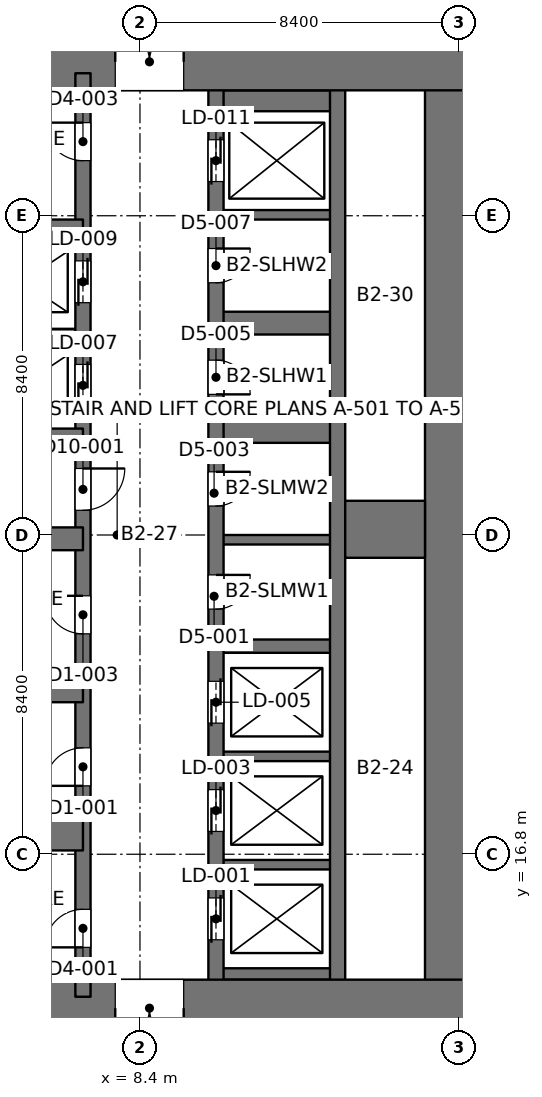
"""IFC4 building model, lengths in metres.
Left out: names, types, materials, properties, quantities, classifications, styles, units other than length and angle.
Written with IfcOpenShell. Run it as: python <this file> out.ifc"""

import sys

from ifc_helpers import new_model, si_unit, direction, frame, frame_2d, origin, place, context, subcontext, project, spatial, rectangle, extrude, element, fill, save


model = new_model("IFC4")
c1 = context("Model", 3, precision=1e-05, world=origin(), true_north=direction((0.0, 1.0)))
c2 = subcontext(c1, "Body", "Model", "MODEL_VIEW")
j1 = project(units=[si_unit("LENGTHUNIT", "METRE"), si_unit("PLANEANGLEUNIT", "RADIAN")], contexts=[c1])
p1 = place(None, origin())
s1 = spatial("IfcSite", under=j1, at=p1, CompositionType="ELEMENT")
p2 = place(p1, origin())
s2 = spatial("IfcBuilding", under=s1, at=p2, CompositionType="ELEMENT")
p3 = place(p2, frame((0.0, 0.0, -8.4)))
s3 = spatial("IfcBuildingStorey", under=s2, at=p3, CompositionType="ELEMENT", Elevation=-8.4)
p4 = place(p3, frame((-1.8, 12.75, 0.0), z_axis=(0.0, 0.0, 1.0), x_axis=(1.0, 0.0, 0.0)))
e1 = element("IfcWall", 1, at=p4, inside=s3, PredefinedType="SHEAR", context=c2, shape_type="SweptSolid", body=[
    extrude(rectangle(XDim=19.2, YDim=1.5, at=frame_2d((9.6, 0.0))), origin(), (0.0, 0.0, 1.0), 4.2),
])
p5 = place(p4, frame((9.55, 0.0, 0.0)))
e2 = element("IfcOpeningElement", 2, at=p5, cuts=e1, PredefinedType="OPENING", context=c2, shape_type="SweptSolid", body=[
    extrude(rectangle(XDim=1.8, YDim=2.4, at=frame_2d((0.9, 1.2))), frame((0.0, 0.76, 0.0), z_axis=(0.0, -1.0, 0.0), x_axis=(1.0, 0.0, 0.0)), (0.0, 0.0, 1.0), 1.52),
])
p6 = place(p3, frame((-1.8, 37.65, 0.0), z_axis=(0.0, 0.0, 1.0), x_axis=(1.0, 0.0, 0.0)))
e3 = element("IfcWall", 3, at=p6, inside=s3, PredefinedType="SHEAR", context=c2, shape_type="SweptSolid", body=[
    extrude(rectangle(XDim=19.2, YDim=1.5, at=frame_2d((9.6, 0.0))), origin(), (0.0, 0.0, 1.0), 4.2),
])
p7 = place(p6, frame((9.55, 0.0, 0.0)))
e4 = element("IfcOpeningElement", 4, at=p7, cuts=e3, PredefinedType="OPENING", context=c2, shape_type="SweptSolid", body=[
    extrude(rectangle(XDim=1.8, YDim=2.4, at=frame_2d((0.9, 1.2))), frame((0.0, 0.76, 0.0), z_axis=(0.0, -1.0, 0.0), x_axis=(1.0, 0.0, 0.0)), (0.0, 0.0, 1.0), 1.52),
])
p8 = place(p3, frame((16.65, 12.75, 0.0), z_axis=(0.0, 0.0, 1.0), x_axis=(0.0, 1.0, 0.0)))
e5 = element("IfcWall", 5, at=p8, inside=s3, PredefinedType="SHEAR", context=c2, shape_type="SweptSolid", body=[
    extrude(rectangle(XDim=24.9, YDim=1.5, at=frame_2d((12.45, 0.0))), origin(), (0.0, 0.0, 1.0), 4.2),
])
p9 = place(p3, frame((6.9, 13.05, 0.0), z_axis=(0.0, 0.0, 1.0), x_axis=(0.0, 1.0, 0.0)))
e6 = element("IfcWall", 6, at=p9, inside=s3, PredefinedType="SHEAR", context=c2, shape_type="SweptSolid", body=[
    extrude(rectangle(XDim=24.3, YDim=0.4, at=frame_2d((12.15, 0.0))), origin(), (0.0, 0.0, 1.0), 4.2),
])
p10 = place(p9, frame((1.3, 0.0, 0.0)))
e7 = element("IfcOpeningElement", 7, at=p10, cuts=e6, PredefinedType="OPENING", context=c2, shape_type="SweptSolid", body=[
    extrude(rectangle(XDim=1.0, YDim=2.2, at=frame_2d((0.5, 1.1))), frame((0.0, 0.21, 0.0), z_axis=(0.0, -1.0, 0.0), x_axis=(1.0, 0.0, 0.0)), (0.0, 0.0, 1.0), 0.42),
])
p11 = place(p9, frame((22.0, 0.0, 0.0)))
e8 = element("IfcOpeningElement", 8, at=p11, cuts=e6, PredefinedType="OPENING", context=c2, shape_type="SweptSolid", body=[
    extrude(rectangle(XDim=1.0, YDim=2.2, at=frame_2d((0.5, 1.1))), frame((0.0, 0.21, 0.0), z_axis=(0.0, -1.0, 0.0), x_axis=(1.0, 0.0, 0.0)), (0.0, 0.0, 1.0), 0.42),
])
p12 = place(p9, frame((5.55, 0.0, 0.0)))
e9 = element("IfcOpeningElement", 9, at=p12, cuts=e6, PredefinedType="OPENING", context=c2, shape_type="SweptSolid", body=[
    extrude(rectangle(XDim=1.0, YDim=2.2, at=frame_2d((0.5, 1.1))), frame((0.0, 0.21, 0.0), z_axis=(0.0, -1.0, 0.0), x_axis=(1.0, 0.0, 0.0)), (0.0, 0.0, 1.0), 0.42),
])
p13 = place(p9, frame((9.55, 0.0, 0.0)))
e10 = element("IfcOpeningElement", 10, at=p13, cuts=e6, PredefinedType="OPENING", context=c2, shape_type="SweptSolid", body=[
    extrude(rectangle(XDim=1.0, YDim=2.2, at=frame_2d((0.5, 1.1))), frame((0.0, 0.21, 0.0), z_axis=(0.0, -1.0, 0.0), x_axis=(1.0, 0.0, 0.0)), (0.0, 0.0, 1.0), 0.42),
])
p14 = place(p9, frame((12.8, 0.0, 0.0)))
e11 = element("IfcOpeningElement", 11, at=p14, cuts=e6, PredefinedType="OPENING", context=c2, shape_type="SweptSolid", body=[
    extrude(rectangle(XDim=1.1, YDim=2.2, at=frame_2d((0.55, 1.1))), frame((0.0, 0.21, 0.0), z_axis=(0.0, -1.0, 0.0), x_axis=(1.0, 0.0, 0.0)), (0.0, 0.0, 1.0), 0.42),
])
p15 = place(p9, frame((15.538, 0.0, 0.0)))
e12 = element("IfcOpeningElement", 12, at=p15, cuts=e6, PredefinedType="OPENING", context=c2, shape_type="SweptSolid", body=[
    extrude(rectangle(XDim=1.1, YDim=2.2, at=frame_2d((0.55, 1.1))), frame((0.0, 0.21, 0.0), z_axis=(0.0, -1.0, 0.0), x_axis=(1.0, 0.0, 0.0)), (0.0, 0.0, 1.0), 0.42),
])
p16 = place(p9, frame((18.262, 0.0, 0.0)))
e13 = element("IfcOpeningElement", 13, at=p16, cuts=e6, PredefinedType="OPENING", context=c2, shape_type="SweptSolid", body=[
    extrude(rectangle(XDim=1.1, YDim=2.2, at=frame_2d((0.55, 1.1))), frame((0.0, 0.21, 0.0), z_axis=(0.0, -1.0, 0.0), x_axis=(1.0, 0.0, 0.0)), (0.0, 0.0, 1.0), 0.42),
])
p17 = place(p3, frame((10.4, 13.05, 0.0), z_axis=(0.0, 0.0, 1.0), x_axis=(0.0, 1.0, 0.0)))
e14 = element("IfcWall", 14, at=p17, inside=s3, PredefinedType="SHEAR", context=c2, shape_type="SweptSolid", body=[
    extrude(rectangle(XDim=24.3, YDim=0.4, at=frame_2d((12.15, 0.0))), origin(), (0.0, 0.0, 1.0), 4.2),
])
p18 = place(p17, frame((1.5, 0.0, 0.0)))
e15 = element("IfcOpeningElement", 15, at=p18, cuts=e14, PredefinedType="OPENING", context=c2, shape_type="SweptSolid", body=[
    extrude(rectangle(XDim=1.1, YDim=2.2, at=frame_2d((0.55, 1.1))), frame((0.0, 0.21, 0.0), z_axis=(0.0, -1.0, 0.0), x_axis=(1.0, 0.0, 0.0)), (0.0, 0.0, 1.0), 0.42),
])
p19 = place(p17, frame((4.35, 0.0, 0.0)))
e16 = element("IfcOpeningElement", 16, at=p19, cuts=e14, PredefinedType="OPENING", context=c2, shape_type="SweptSolid", body=[
    extrude(rectangle(XDim=1.1, YDim=2.2, at=frame_2d((0.55, 1.1))), frame((0.0, 0.21, 0.0), z_axis=(0.0, -1.0, 0.0), x_axis=(1.0, 0.0, 0.0)), (0.0, 0.0, 1.0), 0.42),
])
p20 = place(p17, frame((7.2, 0.0, 0.0)))
e17 = element("IfcOpeningElement", 17, at=p20, cuts=e14, PredefinedType="OPENING", context=c2, shape_type="SweptSolid", body=[
    extrude(rectangle(XDim=1.1, YDim=2.2, at=frame_2d((0.55, 1.1))), frame((0.0, 0.21, 0.0), z_axis=(0.0, -1.0, 0.0), x_axis=(1.0, 0.0, 0.0)), (0.0, 0.0, 1.0), 0.42),
])
p21 = place(p17, frame((21.45, 0.0, 0.0)))
e18 = element("IfcOpeningElement", 18, at=p21, cuts=e14, PredefinedType="OPENING", context=c2, shape_type="SweptSolid", body=[
    extrude(rectangle(XDim=1.1, YDim=2.2, at=frame_2d((0.55, 1.1))), frame((0.0, 0.21, 0.0), z_axis=(0.0, -1.0, 0.0), x_axis=(1.0, 0.0, 0.0)), (0.0, 0.0, 1.0), 0.42),
])
p22 = place(p17, frame((10.2, 0.0, 0.0)))
e19 = element("IfcOpeningElement", 19, at=p22, cuts=e14, PredefinedType="OPENING", context=c2, shape_type="SweptSolid", body=[
    extrude(rectangle(XDim=0.9, YDim=2.2, at=frame_2d((0.45, 1.1))), frame((0.0, 0.21, 0.0), z_axis=(0.0, -1.0, 0.0), x_axis=(1.0, 0.0, 0.0)), (0.0, 0.0, 1.0), 0.42),
])
p23 = place(p17, frame((12.913, 0.0, 0.0)))
e20 = element("IfcOpeningElement", 20, at=p23, cuts=e14, PredefinedType="OPENING", context=c2, shape_type="SweptSolid", body=[
    extrude(rectangle(XDim=0.9, YDim=2.2, at=frame_2d((0.45, 1.1))), frame((0.0, 0.21, 0.0), z_axis=(0.0, -1.0, 0.0), x_axis=(1.0, 0.0, 0.0)), (0.0, 0.0, 1.0), 0.42),
])
p24 = place(p17, frame((15.85, 0.0, 0.0)))
e21 = element("IfcOpeningElement", 21, at=p24, cuts=e14, PredefinedType="OPENING", context=c2, shape_type="SweptSolid", body=[
    extrude(rectangle(XDim=0.9, YDim=2.2, at=frame_2d((0.45, 1.1))), frame((0.0, 0.21, 0.0), z_axis=(0.0, -1.0, 0.0), x_axis=(1.0, 0.0, 0.0)), (0.0, 0.0, 1.0), 0.42),
])
p25 = place(p17, frame((18.788, 0.0, 0.0)))
e22 = element("IfcOpeningElement", 22, at=p25, cuts=e14, PredefinedType="OPENING", context=c2, shape_type="SweptSolid", body=[
    extrude(rectangle(XDim=0.9, YDim=2.2, at=frame_2d((0.45, 1.1))), frame((0.0, 0.21, 0.0), z_axis=(0.0, -1.0, 0.0), x_axis=(1.0, 0.0, 0.0)), (0.0, 0.0, 1.0), 0.42),
])
p26 = place(p3, frame((13.6, 13.05, 0.0), z_axis=(0.0, 0.0, 1.0), x_axis=(0.0, 1.0, 0.0)))
e23 = element("IfcWall", 23, at=p26, inside=s3, PredefinedType="SHEAR", context=c2, shape_type="SweptSolid", body=[
    extrude(rectangle(XDim=24.3, YDim=0.4, at=frame_2d((12.15, 0.0))), origin(), (0.0, 0.0, 1.0), 4.2),
])
p27 = place(p3, frame((-0.75, 17.35, 0.0), z_axis=(0.0, 0.0, 1.0), x_axis=(1.0, 0.0, 0.0)))
e24 = element("IfcWall", 24, at=p27, inside=s3, PredefinedType="SHEAR", context=c2, shape_type="SweptSolid", body=[
    extrude(rectangle(XDim=7.65, YDim=0.9, at=frame_2d((3.825, 0.0))), origin(), (0.0, 0.0, 1.0), 4.2),
])
for number, where, z_axis, x_axis in (
    (25, (-0.75, 21.1, 0.0), (0.0, 0.0, 1.0), (1.0, 0.0, 0.0)),
    (26, (-0.75, 25.1, 0.0), (0.0, 0.0, 1.0), (1.0, 0.0, 0.0)),
    (27, (-0.75, 27.7, 0.0), (0.0, 0.0, 1.0), (1.0, 0.0, 0.0)),
):
    element("IfcWall", number, at=place(p3, frame(where, z_axis=z_axis, x_axis=x_axis)), inside=s3, PredefinedType="SHEAR", context=c2, shape_type="SweptSolid", body=[
        extrude(rectangle(XDim=7.65, YDim=0.6, at=frame_2d((3.825, 0.0))), origin(), (0.0, 0.0, 1.0), 4.2),
    ])
p28 = place(p3, frame((3.7, 33.3, 0.0), z_axis=(0.0, 0.0, 1.0), x_axis=(1.0, 0.0, 0.0)))
e28 = element("IfcWall", 28, at=p28, inside=s3, PredefinedType="SHEAR", context=c2, shape_type="SweptSolid", body=[
    extrude(rectangle(XDim=3.2, YDim=0.4, at=frame_2d((1.6, 0.0))), origin(), (0.0, 0.0, 1.0), 4.2),
])
p29 = place(p3, frame((3.7, 30.5, 0.0), z_axis=(0.0, 0.0, 1.0), x_axis=(1.0, 0.0, 0.0)))
e29 = element("IfcWall", 29, at=p29, inside=s3, PredefinedType="SHEAR", context=c2, shape_type="SweptSolid", body=[
    extrude(rectangle(XDim=3.2, YDim=0.25, at=frame_2d((1.6, 0.0))), origin(), (0.0, 0.0, 1.0), 4.2),
])
p30 = place(p3, frame((13.8, 25.35, 0.0), z_axis=(0.0, 0.0, 1.0), x_axis=(1.0, 0.0, 0.0)))
e30 = element("IfcWall", 30, at=p30, inside=s3, PredefinedType="SHEAR", context=c2, shape_type="SweptSolid", body=[
    extrude(rectangle(XDim=2.1, YDim=1.5, at=frame_2d((1.05, 0.0))), origin(), (0.0, 0.0, 1.0), 4.2),
])
p31 = place(p3, frame((10.4, 13.65, 0.0), z_axis=(0.0, 0.0, 1.0), x_axis=(1.0, 0.0, 0.0)))
e31 = element("IfcWall", 31, at=p31, inside=s3, PredefinedType="SHEAR", context=c2, shape_type="SweptSolid", body=[
    extrude(rectangle(XDim=3.2, YDim=0.3, at=frame_2d((1.6, 0.0))), origin(), (0.0, 0.0, 1.0), 4.2),
])
for number, where, z_axis, x_axis in (
    (32, (10.4, 16.525, 0.0), (0.0, 0.0, 1.0), (1.0, 0.0, 0.0)),
    (33, (10.4, 19.375, 0.0), (0.0, 0.0, 1.0), (1.0, 0.0, 0.0)),
):
    element("IfcWall", number, at=place(p3, frame(where, z_axis=z_axis, x_axis=x_axis)), inside=s3, PredefinedType="SHEAR", context=c2, shape_type="SweptSolid", body=[
        extrude(rectangle(XDim=3.2, YDim=0.25, at=frame_2d((1.6, 0.0))), origin(), (0.0, 0.0, 1.0), 4.2),
    ])
p32 = place(p3, frame((10.4, 22.275, 0.0), z_axis=(0.0, 0.0, 1.0), x_axis=(1.0, 0.0, 0.0)))
e34 = element("IfcWall", 34, at=p32, inside=s3, PredefinedType="SHEAR", context=c2, shape_type="SweptSolid", body=[
    extrude(rectangle(XDim=3.2, YDim=0.35, at=frame_2d((1.6, 0.0))), origin(), (0.0, 0.0, 1.0), 4.2),
])
p33 = place(p3, frame((10.4, 25.075, 0.0), z_axis=(0.0, 0.0, 1.0), x_axis=(1.0, 0.0, 0.0)))
e35 = element("IfcWall", 35, at=p33, inside=s3, PredefinedType="SHEAR", context=c2, shape_type="SweptSolid", body=[
    extrude(rectangle(XDim=3.2, YDim=0.25, at=frame_2d((1.6, 0.0))), origin(), (0.0, 0.0, 1.0), 4.2),
])
for number, where, z_axis, x_axis in (
    (36, (10.4, 27.925, 0.0), (0.0, 0.0, 1.0), (1.0, 0.0, 0.0)),
    (37, (10.4, 30.775, 0.0), (0.0, 0.0, 1.0), (1.0, 0.0, 0.0)),
):
    element("IfcWall", number, at=place(p3, frame(where, z_axis=z_axis, x_axis=x_axis)), inside=s3, PredefinedType="SHEAR", context=c2, shape_type="SweptSolid", body=[
        extrude(rectangle(XDim=3.2, YDim=0.6, at=frame_2d((1.6, 0.0))), origin(), (0.0, 0.0, 1.0), 4.2),
    ])
p34 = place(p3, frame((10.4, 33.625, 0.0), z_axis=(0.0, 0.0, 1.0), x_axis=(1.0, 0.0, 0.0)))
e38 = element("IfcWall", 38, at=p34, inside=s3, PredefinedType="SHEAR", context=c2, shape_type="SweptSolid", body=[
    extrude(rectangle(XDim=3.2, YDim=0.25, at=frame_2d((1.6, 0.0))), origin(), (0.0, 0.0, 1.0), 4.2),
])
p35 = place(p3, frame((10.4, 36.625, 0.0), z_axis=(0.0, 0.0, 1.0), x_axis=(1.0, 0.0, 0.0)))
e39 = element("IfcWall", 39, at=p35, inside=s3, PredefinedType="SHEAR", context=c2, shape_type="SweptSolid", body=[
    extrude(rectangle(XDim=3.2, YDim=0.55, at=frame_2d((1.6, 0.0))), origin(), (0.0, 0.0, 1.0), 4.2),
])
p36 = place(p3, frame((16.82, 25.2, 0.0), z_axis=(0.0, 0.0, 1.0), x_axis=(1.0, 0.0, 0.0)))
e40 = element("IfcWall", 40, at=p36, inside=s3, PredefinedType="PARTITIONING", context=c2, shape_type="SweptSolid", body=[
    extrude(rectangle(XDim=16.76, YDim=0.25, at=frame_2d((8.38, 0.0))), origin(), (0.0, 0.0, 1.0), 3.85),
])
p37 = place(p36, frame((3.18, 0.0, 0.0)))
e41 = element("IfcOpeningElement", 41, at=p37, cuts=e40, PredefinedType="OPENING", context=c2, shape_type="SweptSolid", body=[
    extrude(rectangle(XDim=2.0, YDim=2.4, at=frame_2d((1.0, 1.2))), frame((0.0, 0.135, 0.0), z_axis=(0.0, -1.0, 0.0), x_axis=(1.0, 0.0, 0.0)), (0.0, 0.0, 1.0), 0.27),
])
p38 = place(p5, frame((1.8, 0.0, 0.0), z_axis=(0.0, 0.0, 1.0), x_axis=(-1.0, 0.0, 0.0)))
e42 = element("IfcDoor", 42, at=p38, inside=s3, OperationType="DOUBLE_DOOR_SINGLE_SWING", PredefinedType="DOOR", context=c2, shape_type="SweptSolid", body=[
    extrude(rectangle(XDim=1.8, YDim=2.4, at=frame_2d((0.9, 1.2))), frame((0.0, 0.025, 0.0), z_axis=(0.0, -1.0, 0.0), x_axis=(1.0, 0.0, 0.0)), (0.0, 0.0, 1.0), 0.05),
])
fill(e2, e42)
p39 = place(p7, origin())
e43 = element("IfcDoor", 43, at=p39, inside=s3, OperationType="DOUBLE_DOOR_SINGLE_SWING", PredefinedType="DOOR", context=c2, shape_type="SweptSolid", body=[
    extrude(rectangle(XDim=1.8, YDim=2.4, at=frame_2d((0.9, 1.2))), frame((0.0, 0.025, 0.0), z_axis=(0.0, -1.0, 0.0), x_axis=(1.0, 0.0, 0.0)), (0.0, 0.0, 1.0), 0.05),
])
fill(e4, e43)
p40 = place(p10, origin())
e44 = element("IfcDoor", 44, at=p40, inside=s3, OperationType="SINGLE_SWING_LEFT", PredefinedType="DOOR", context=c2, shape_type="SweptSolid", body=[
    extrude(rectangle(XDim=1.0, YDim=2.2, at=frame_2d((0.5, 1.1))), frame((0.0, 0.025, 0.0), z_axis=(0.0, -1.0, 0.0), x_axis=(1.0, 0.0, 0.0)), (0.0, 0.0, 1.0), 0.05),
])
fill(e7, e44)
p41 = place(p11, origin())
e45 = element("IfcDoor", 45, at=p41, inside=s3, OperationType="SINGLE_SWING_RIGHT", PredefinedType="DOOR", context=c2, shape_type="SweptSolid", body=[
    extrude(rectangle(XDim=1.0, YDim=2.2, at=frame_2d((0.5, 1.1))), frame((0.0, 0.025, 0.0), z_axis=(0.0, -1.0, 0.0), x_axis=(1.0, 0.0, 0.0)), (0.0, 0.0, 1.0), 0.05),
])
fill(e8, e45)
p42 = place(p12, origin())
e46 = element("IfcDoor", 46, at=p42, inside=s3, OperationType="SINGLE_SWING_LEFT", PredefinedType="DOOR", context=c2, shape_type="SweptSolid", body=[
    extrude(rectangle(XDim=1.0, YDim=2.2, at=frame_2d((0.5, 1.1))), frame((0.0, 0.025, 0.0), z_axis=(0.0, -1.0, 0.0), x_axis=(1.0, 0.0, 0.0)), (0.0, 0.0, 1.0), 0.05),
])
fill(e9, e46)
p43 = place(p13, origin())
e47 = element("IfcDoor", 47, at=p43, inside=s3, OperationType="SINGLE_SWING_RIGHT", PredefinedType="DOOR", context=c2, shape_type="SweptSolid", body=[
    extrude(rectangle(XDim=1.0, YDim=2.2, at=frame_2d((0.5, 1.1))), frame((0.0, 0.025, 0.0), z_axis=(0.0, -1.0, 0.0), x_axis=(1.0, 0.0, 0.0)), (0.0, 0.0, 1.0), 0.05),
])
fill(e10, e47)
p44 = place(p14, frame((1.1, 0.0, 0.0), z_axis=(0.0, 0.0, 1.0), x_axis=(-1.0, 0.0, 0.0)))
e48 = element("IfcDoor", 48, at=p44, inside=s3, OperationType="SINGLE_SWING_LEFT", PredefinedType="DOOR", context=c2, shape_type="SweptSolid", body=[
    extrude(rectangle(XDim=1.1, YDim=2.2, at=frame_2d((0.55, 1.1))), frame((0.0, 0.025, 0.0), z_axis=(0.0, -1.0, 0.0), x_axis=(1.0, 0.0, 0.0)), (0.0, 0.0, 1.0), 0.05),
])
fill(e11, e48)
p45 = place(p18, origin())
e49 = element("IfcDoor", 49, at=p45, inside=s3, OperationType="DOUBLE_DOOR_SLIDING", PredefinedType="DOOR", context=c2, shape_type="SweptSolid", body=[
    extrude(rectangle(XDim=1.1, YDim=2.2, at=frame_2d((0.55, 1.1))), frame((0.0, 0.025, 0.0), z_axis=(0.0, -1.0, 0.0), x_axis=(1.0, 0.0, 0.0)), (0.0, 0.0, 1.0), 0.05),
])
fill(e15, e49)
p46 = place(p19, origin())
e50 = element("IfcDoor", 50, at=p46, inside=s3, OperationType="DOUBLE_DOOR_SLIDING", PredefinedType="DOOR", context=c2, shape_type="SweptSolid", body=[
    extrude(rectangle(XDim=1.1, YDim=2.2, at=frame_2d((0.55, 1.1))), frame((0.0, 0.025, 0.0), z_axis=(0.0, -1.0, 0.0), x_axis=(1.0, 0.0, 0.0)), (0.0, 0.0, 1.0), 0.05),
])
fill(e16, e50)
p47 = place(p20, origin())
e51 = element("IfcDoor", 51, at=p47, inside=s3, OperationType="DOUBLE_DOOR_SLIDING", PredefinedType="DOOR", context=c2, shape_type="SweptSolid", body=[
    extrude(rectangle(XDim=1.1, YDim=2.2, at=frame_2d((0.55, 1.1))), frame((0.0, 0.025, 0.0), z_axis=(0.0, -1.0, 0.0), x_axis=(1.0, 0.0, 0.0)), (0.0, 0.0, 1.0), 0.05),
])
fill(e17, e51)
p48 = place(p21, origin())
e52 = element("IfcDoor", 52, at=p48, inside=s3, OperationType="DOUBLE_DOOR_SLIDING", PredefinedType="DOOR", context=c2, shape_type="SweptSolid", body=[
    extrude(rectangle(XDim=1.1, YDim=2.2, at=frame_2d((0.55, 1.1))), frame((0.0, 0.025, 0.0), z_axis=(0.0, -1.0, 0.0), x_axis=(1.0, 0.0, 0.0)), (0.0, 0.0, 1.0), 0.05),
])
fill(e18, e52)
p49 = place(p15, origin())
e53 = element("IfcDoor", 53, at=p49, inside=s3, OperationType="DOUBLE_DOOR_SLIDING", PredefinedType="DOOR", context=c2, shape_type="SweptSolid", body=[
    extrude(rectangle(XDim=1.1, YDim=2.2, at=frame_2d((0.55, 1.1))), frame((0.0, 0.025, 0.0), z_axis=(0.0, -1.0, 0.0), x_axis=(1.0, 0.0, 0.0)), (0.0, 0.0, 1.0), 0.05),
])
fill(e12, e53)
p50 = place(p16, origin())
e54 = element("IfcDoor", 54, at=p50, inside=s3, OperationType="DOUBLE_DOOR_SLIDING", PredefinedType="DOOR", context=c2, shape_type="SweptSolid", body=[
    extrude(rectangle(XDim=1.1, YDim=2.2, at=frame_2d((0.55, 1.1))), frame((0.0, 0.025, 0.0), z_axis=(0.0, -1.0, 0.0), x_axis=(1.0, 0.0, 0.0)), (0.0, 0.0, 1.0), 0.05),
])
fill(e13, e54)
p51 = place(p22, frame((0.9, 0.0, 0.0), z_axis=(0.0, 0.0, 1.0), x_axis=(-1.0, 0.0, 0.0)))
e55 = element("IfcDoor", 55, at=p51, inside=s3, OperationType="SINGLE_SWING_LEFT", PredefinedType="DOOR", context=c2, shape_type="SweptSolid", body=[
    extrude(rectangle(XDim=0.9, YDim=2.2, at=frame_2d((0.45, 1.1))), frame((0.0, 0.025, 0.0), z_axis=(0.0, -1.0, 0.0), x_axis=(1.0, 0.0, 0.0)), (0.0, 0.0, 1.0), 0.05),
])
fill(e19, e55)
p52 = place(p23, frame((0.9, 0.0, 0.0), z_axis=(0.0, 0.0, 1.0), x_axis=(-1.0, 0.0, 0.0)))
e56 = element("IfcDoor", 56, at=p52, inside=s3, OperationType="SINGLE_SWING_LEFT", PredefinedType="DOOR", context=c2, shape_type="SweptSolid", body=[
    extrude(rectangle(XDim=0.9, YDim=2.2, at=frame_2d((0.45, 1.1))), frame((0.0, 0.025, 0.0), z_axis=(0.0, -1.0, 0.0), x_axis=(1.0, 0.0, 0.0)), (0.0, 0.0, 1.0), 0.05),
])
fill(e20, e56)
p53 = place(p24, frame((0.9, 0.0, 0.0), z_axis=(0.0, 0.0, 1.0), x_axis=(-1.0, 0.0, 0.0)))
e57 = element("IfcDoor", 57, at=p53, inside=s3, OperationType="SINGLE_SWING_RIGHT", PredefinedType="DOOR", context=c2, shape_type="SweptSolid", body=[
    extrude(rectangle(XDim=0.9, YDim=2.2, at=frame_2d((0.45, 1.1))), frame((0.0, 0.025, 0.0), z_axis=(0.0, -1.0, 0.0), x_axis=(1.0, 0.0, 0.0)), (0.0, 0.0, 1.0), 0.05),
])
fill(e21, e57)
p54 = place(p25, frame((0.9, 0.0, 0.0), z_axis=(0.0, 0.0, 1.0), x_axis=(-1.0, 0.0, 0.0)))
e58 = element("IfcDoor", 58, at=p54, inside=s3, OperationType="SINGLE_SWING_LEFT", PredefinedType="DOOR", context=c2, shape_type="SweptSolid", body=[
    extrude(rectangle(XDim=0.9, YDim=2.2, at=frame_2d((0.45, 1.1))), frame((0.0, 0.025, 0.0), z_axis=(0.0, -1.0, 0.0), x_axis=(1.0, 0.0, 0.0)), (0.0, 0.0, 1.0), 0.05),
])
fill(e22, e58)
save(model, sys.argv[1])
